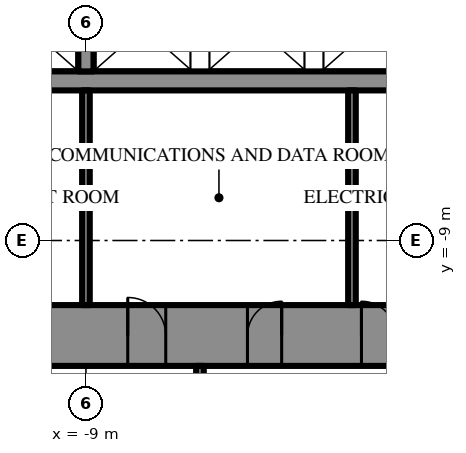
"""IFC4 building model, lengths in metres.
Left out: names, types, materials, properties, quantities, classifications, styles, units other than length and angle.
Written with IfcOpenShell. Run it as: python <this file> out.ifc"""

import sys

from ifc_helpers import new_model, si_unit, direction, frame, frame_2d, origin, place, context, subcontext, project, spatial, rectangle, extrude, element, fill, save


model = new_model("IFC4")
c1 = context("Model", 3, precision=1e-05, world=origin(), true_north=direction((0.0, 1.0)))
c2 = subcontext(c1, "Body", "Model", "MODEL_VIEW")
j1 = project(units=[si_unit("LENGTHUNIT", "METRE"), si_unit("PLANEANGLEUNIT", "RADIAN")], contexts=[c1])
p1 = place(None, origin())
s1 = spatial("IfcSite", under=j1, at=p1, CompositionType="ELEMENT")
p2 = place(p1, origin())
s2 = spatial("IfcBuilding", under=s1, at=p2, CompositionType="ELEMENT")
p3 = place(p2, frame((0.0, 0.0, 291.1)))
s3 = spatial("IfcBuildingStorey", under=s2, at=p3, CompositionType="ELEMENT", Elevation=291.1)
p4 = place(p3, frame((15.5, -11.5, 0.0), z_axis=(0.0, 0.0, 1.0), x_axis=(-1.0, 0.0, 0.0)))
e1 = element("IfcWall", 1, at=p4, inside=s3, PredefinedType="SHEAR", context=c2, shape_type="SweptSolid", body=[
    extrude(rectangle(XDim=31.0, YDim=1.6, at=frame_2d((15.5, 0.0))), origin(), (0.0, 0.0, 1.0), 4.2),
])
p5 = place(p4, frame((16.35, 0.0, 0.0)))
e2 = element("IfcOpeningElement", 2, at=p5, cuts=e1, PredefinedType="OPENING", context=c2, shape_type="SweptSolid", body=[
    extrude(rectangle(XDim=0.9, YDim=2.2, at=frame_2d((0.45, 1.1))), frame((0.0, 0.81, 0.0), z_axis=(0.0, -1.0, 0.0), x_axis=(1.0, 0.0, 0.0)), (0.0, 0.0, 1.0), 1.62),
])
p6 = place(p4, frame((19.35, 0.0, 0.0)))
e3 = element("IfcOpeningElement", 3, at=p6, cuts=e1, PredefinedType="OPENING", context=c2, shape_type="SweptSolid", body=[
    extrude(rectangle(XDim=0.9, YDim=2.2, at=frame_2d((0.45, 1.1))), frame((0.0, 0.81, 0.0), z_axis=(0.0, -1.0, 0.0), x_axis=(1.0, 0.0, 0.0)), (0.0, 0.0, 1.0), 1.62),
])
p7 = place(p4, frame((22.4, 0.0, 0.0)))
e4 = element("IfcOpeningElement", 4, at=p7, cuts=e1, PredefinedType="OPENING", context=c2, shape_type="SweptSolid", body=[
    extrude(rectangle(XDim=1.0, YDim=2.2, at=frame_2d((0.5, 1.1))), frame((0.0, 0.81, 0.0), z_axis=(0.0, -1.0, 0.0), x_axis=(1.0, 0.0, 0.0)), (0.0, 0.0, 1.0), 1.62),
])
p8 = place(p4, frame((1.65, 0.0, 0.0)))
e5 = element("IfcOpeningElement", 5, at=p8, cuts=e1, PredefinedType="OPENING", context=c2, shape_type="SweptSolid", body=[
    extrude(rectangle(XDim=0.9, YDim=2.2, at=frame_2d((0.45, 1.1))), frame((0.0, 0.81, 0.0), z_axis=(0.0, -1.0, 0.0), x_axis=(1.0, 0.0, 0.0)), (0.0, 0.0, 1.0), 1.62),
])
p9 = place(p4, frame((4.65, 0.0, 0.0)))
e6 = element("IfcOpeningElement", 6, at=p9, cuts=e1, PredefinedType="OPENING", context=c2, shape_type="SweptSolid", body=[
    extrude(rectangle(XDim=0.9, YDim=2.2, at=frame_2d((0.45, 1.1))), frame((0.0, 0.81, 0.0), z_axis=(0.0, -1.0, 0.0), x_axis=(1.0, 0.0, 0.0)), (0.0, 0.0, 1.0), 1.62),
])
p10 = place(p4, frame((25.45, 0.0, 0.0)))
e7 = element("IfcOpeningElement", 7, at=p10, cuts=e1, PredefinedType="OPENING", context=c2, shape_type="SweptSolid", body=[
    extrude(rectangle(XDim=0.9, YDim=2.2, at=frame_2d((0.45, 1.1))), frame((0.0, 0.81, 0.0), z_axis=(0.0, -1.0, 0.0), x_axis=(1.0, 0.0, 0.0)), (0.0, 0.0, 1.0), 1.62),
])
p11 = place(p4, frame((28.45, 0.0, 0.0)))
e8 = element("IfcOpeningElement", 8, at=p11, cuts=e1, PredefinedType="OPENING", context=c2, shape_type="SweptSolid", body=[
    extrude(rectangle(XDim=0.9, YDim=2.2, at=frame_2d((0.45, 1.1))), frame((0.0, 0.81, 0.0), z_axis=(0.0, -1.0, 0.0), x_axis=(1.0, 0.0, 0.0)), (0.0, 0.0, 1.0), 1.62),
])
p12 = place(p3, frame((11.7, -4.8, 0.0), z_axis=(0.0, 0.0, 1.0), x_axis=(-1.0, 0.0, 0.0)))
e9 = element("IfcWall", 9, at=p12, inside=s3, PredefinedType="SHEAR", context=c2, shape_type="SweptSolid", body=[
    extrude(rectangle(XDim=23.4, YDim=0.5, at=frame_2d((11.7, 0.0))), origin(), (0.0, 0.0, 1.0), 4.2),
])
p13 = place(p12, frame((6.6, 0.0, 0.0)))
e10 = element("IfcOpeningElement", 10, at=p13, cuts=e9, PredefinedType="OPENING", context=c2, shape_type="SweptSolid", body=[
    extrude(rectangle(XDim=1.2, YDim=2.2, at=frame_2d((0.6, 1.1))), frame((0.0, 0.26, 0.0), z_axis=(0.0, -1.0, 0.0), x_axis=(1.0, 0.0, 0.0)), (0.0, 0.0, 1.0), 0.52),
])
p14 = place(p12, frame((3.6, 0.0, 0.0)))
e11 = element("IfcOpeningElement", 11, at=p14, cuts=e9, PredefinedType="OPENING", context=c2, shape_type="SweptSolid", body=[
    extrude(rectangle(XDim=1.2, YDim=2.2, at=frame_2d((0.6, 1.1))), frame((0.0, 0.26, 0.0), z_axis=(0.0, -1.0, 0.0), x_axis=(1.0, 0.0, 0.0)), (0.0, 0.0, 1.0), 0.52),
])
p15 = place(p3, frame((-9.0, -2.25, 0.0), z_axis=(0.0, 0.0, 1.0), x_axis=(0.0, -1.0, 0.0)))
e12 = element("IfcWall", 12, at=p15, inside=s3, PredefinedType="SHEAR", context=c2, shape_type="SweptSolid", body=[
    extrude(rectangle(XDim=2.3, YDim=0.4, at=frame_2d((1.15, 0.0))), origin(), (0.0, 0.0, 1.0), 4.2),
])
for number, where, z_axis, x_axis in (
    (13, (-9.0, -5.05, 0.0), (0.0, 0.0, 1.0), (0.0, -1.0, 0.0)),
    (14, (-2.0, -5.05, 0.0), (0.0, 0.0, 1.0), (0.0, -1.0, 0.0)),
):
    element("IfcWall", number, at=place(p3, frame(where, z_axis=z_axis, x_axis=x_axis)), inside=s3, PredefinedType="PARTITIONING", context=c2, shape_type="SweptSolid", body=[
        extrude(rectangle(XDim=5.65, YDim=0.2, at=frame_2d((2.825, 0.0))), origin(), (0.0, 0.0, 1.0), 4.0),
    ])
p16 = place(p3, frame((-6.0, -12.3, 0.0), z_axis=(0.0, 0.0, 1.0), x_axis=(0.0, -1.0, 0.0)))
e15 = element("IfcWall", 15, at=p16, inside=s3, PredefinedType="PARTITIONING", context=c2, shape_type="SweptSolid", body=[
    extrude(rectangle(XDim=16.5, YDim=0.2, at=frame_2d((8.25, 0.0))), origin(), (0.0, 0.0, 1.0), 4.0),
])
p17 = place(p5, frame((0.9, 0.0, 0.0), z_axis=(0.0, 0.0, 1.0), x_axis=(-1.0, 0.0, 0.0)))
e16 = element("IfcDoor", 16, at=p17, inside=s3, OperationType="SINGLE_SWING_RIGHT", PredefinedType="DOOR", context=c2, shape_type="SweptSolid", body=[
    extrude(rectangle(XDim=0.9, YDim=2.2, at=frame_2d((0.45, 1.1))), frame((0.0, 0.025, 0.0), z_axis=(0.0, -1.0, 0.0), x_axis=(1.0, 0.0, 0.0)), (0.0, 0.0, 1.0), 0.05),
])
fill(e2, e16)
p18 = place(p6, frame((0.9, 0.0, 0.0), z_axis=(0.0, 0.0, 1.0), x_axis=(-1.0, 0.0, 0.0)))
e17 = element("IfcDoor", 17, at=p18, inside=s3, OperationType="SINGLE_SWING_LEFT", PredefinedType="DOOR", context=c2, shape_type="SweptSolid", body=[
    extrude(rectangle(XDim=0.9, YDim=2.2, at=frame_2d((0.45, 1.1))), frame((0.0, 0.025, 0.0), z_axis=(0.0, -1.0, 0.0), x_axis=(1.0, 0.0, 0.0)), (0.0, 0.0, 1.0), 0.05),
])
fill(e3, e17)
p19 = place(p7, frame((1.0, 0.0, 0.0), z_axis=(0.0, 0.0, 1.0), x_axis=(-1.0, 0.0, 0.0)))
e18 = element("IfcDoor", 18, at=p19, inside=s3, OperationType="SINGLE_SWING_RIGHT", PredefinedType="DOOR", context=c2, shape_type="SweptSolid", body=[
    extrude(rectangle(XDim=1.0, YDim=2.2, at=frame_2d((0.5, 1.1))), frame((0.0, 0.025, 0.0), z_axis=(0.0, -1.0, 0.0), x_axis=(1.0, 0.0, 0.0)), (0.0, 0.0, 1.0), 0.05),
])
fill(e4, e18)
save(model, sys.argv[1])
